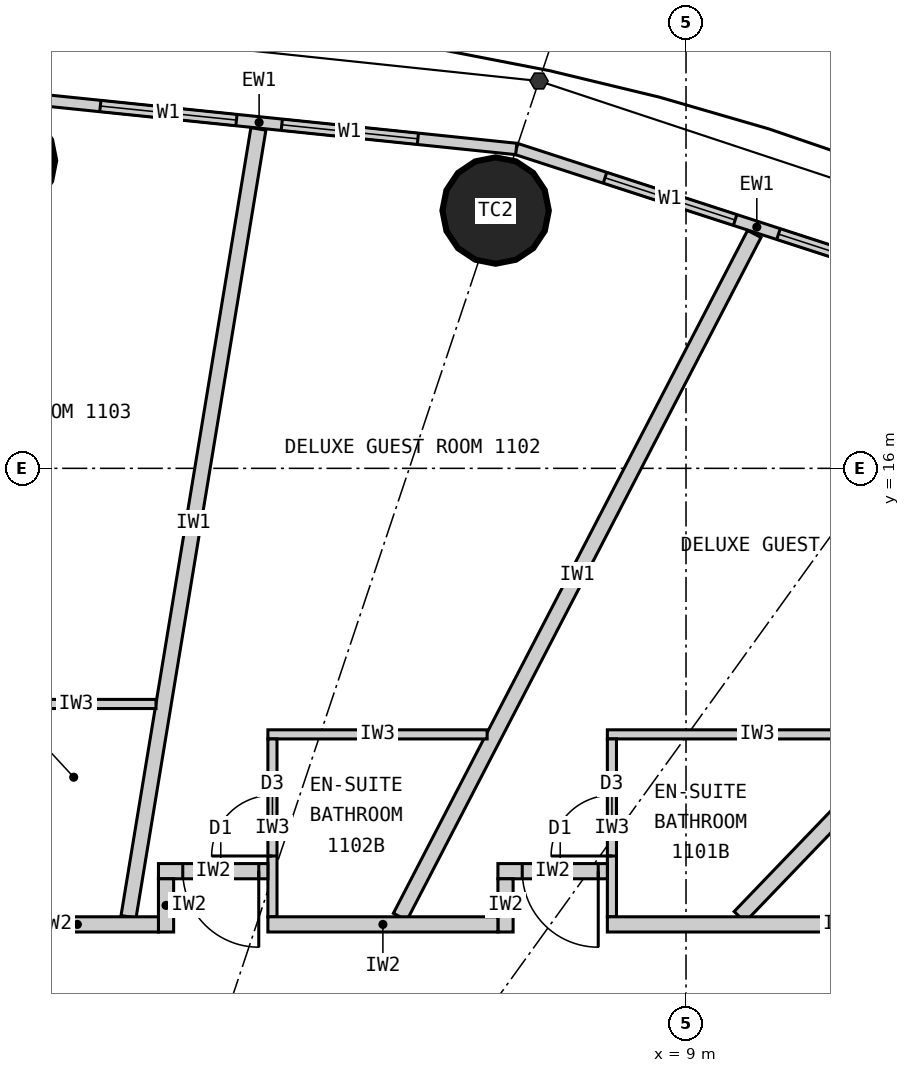
"""IFC4 building model, lengths in metres.
Left out: names, types, materials, properties, quantities, classifications, styles, units other than length and angle.
Written with IfcOpenShell. Run it as: python <this file> out.ifc"""

import sys

from ifc_helpers import new_model, si_unit, direction, frame, frame_2d, origin, origin_2d, place, context, subcontext, project, spatial, rectangle, circle, extrude, element, fill, save


model = new_model("IFC4")
c1 = context("Model", 3, precision=1e-05, world=origin(), true_north=direction((0.0, 1.0)))
c2 = subcontext(c1, "Body", "Model", "MODEL_VIEW")
j1 = project(units=[si_unit("LENGTHUNIT", "METRE"), si_unit("PLANEANGLEUNIT", "RADIAN")], contexts=[c1])
p1 = place(None, origin())
s1 = spatial("IfcSite", under=j1, at=p1, CompositionType="ELEMENT")
p2 = place(p1, origin())
s2 = spatial("IfcBuilding", under=s1, at=p2, CompositionType="ELEMENT")
p3 = place(p2, frame((0.0, 0.0, 50.7)))
s3 = spatial("IfcBuildingStorey", under=s2, at=p3, CompositionType="ELEMENT", Elevation=50.7)
for number, where, z_axis, x_axis in (
    (1, (6.495, 19.391, 0.0), (0.0, 0.0, 1.0), (1.0, 0.0, 0.0)),
    (2, (0.0, 20.05, 0.0), (0.0, 0.0, 1.0), (1.0, 0.0, 0.0)),
):
    element("IfcColumn", number, at=place(p3, frame(where, z_axis=z_axis, x_axis=x_axis)), inside=s3, PredefinedType="COLUMN", context=c2, shape_type="SweptSolid", body=[
        extrude(circle(Radius=0.7, at=origin_2d()), origin(), (0.0, 0.0, 1.0), 3.3),
    ])
p4 = place(p3, frame((13.096, 18.147, 0.0), z_axis=(0.0, 0.0, 1.0), x_axis=(-0.951137534625, 0.308767534285, 0.0)))
e3 = element("IfcWall", 3, at=p4, inside=s3, PredefinedType="ELEMENTEDWALL", context=c2, shape_type="SweptSolid", body=[
    extrude(rectangle(XDim=6.655, YDim=0.15, at=frame_2d((3.328, 0.0))), origin(), (0.0, 0.0, 1.0), 3.12),
])
p5 = place(p4, frame((1.228, 0.0, 0.9)))
e4 = element("IfcOpeningElement", 4, at=p5, cuts=e3, PredefinedType="OPENING", context=c2, shape_type="SweptSolid", body=[
    extrude(rectangle(XDim=1.8, YDim=1.9, at=frame_2d((0.9, 0.95))), frame((0.0, 0.085, 0.0), z_axis=(0.0, -1.0, 0.0), x_axis=(1.0, 0.0, 0.0)), (0.0, 0.0, 1.0), 0.17),
])
p6 = place(p4, frame((3.628, 0.0, 0.9)))
e5 = element("IfcOpeningElement", 5, at=p6, cuts=e3, PredefinedType="OPENING", context=c2, shape_type="SweptSolid", body=[
    extrude(rectangle(XDim=1.8, YDim=1.9, at=frame_2d((0.9, 0.95))), frame((0.0, 0.085, 0.0), z_axis=(0.0, -1.0, 0.0), x_axis=(1.0, 0.0, 0.0)), (0.0, 0.0, 1.0), 0.17),
])
p7 = place(p3, frame((6.766, 20.202, 0.0), z_axis=(0.0, 0.0, 1.0), x_axis=(-0.994721394369, 0.102612609291, 0.0)))
e6 = element("IfcWall", 6, at=p7, inside=s3, PredefinedType="ELEMENTEDWALL", context=c2, shape_type="SweptSolid", body=[
    extrude(rectangle(XDim=6.802, YDim=0.15, at=frame_2d((3.401, 0.0))), origin(), (0.0, 0.0, 1.0), 3.12),
])
p8 = place(p7, frame((1.301, 0.0, 0.9)))
e7 = element("IfcOpeningElement", 7, at=p8, cuts=e6, PredefinedType="OPENING", context=c2, shape_type="SweptSolid", body=[
    extrude(rectangle(XDim=1.8, YDim=1.9, at=frame_2d((0.9, 0.95))), frame((0.0, 0.085, 0.0), z_axis=(0.0, -1.0, 0.0), x_axis=(1.0, 0.0, 0.0)), (0.0, 0.0, 1.0), 0.17),
])
p9 = place(p7, frame((3.701, 0.0, 0.9)))
e8 = element("IfcOpeningElement", 8, at=p9, cuts=e6, PredefinedType="OPENING", context=c2, shape_type="SweptSolid", body=[
    extrude(rectangle(XDim=1.8, YDim=1.9, at=frame_2d((0.9, 0.95))), frame((0.0, 0.085, 0.0), z_axis=(0.0, -1.0, 0.0), x_axis=(1.0, 0.0, 0.0)), (0.0, 0.0, 1.0), 0.17),
])
p10 = place(p3, frame((9.705, 10.1, 0.0), z_axis=(0.0, 0.0, 1.0), x_axis=(0.692879226267, 0.721053658064, 0.0)))
e9 = element("IfcWall", 9, at=p10, inside=s3, PredefinedType="PARTITIONING", context=c2, shape_type="SweptSolid", body=[
    extrude(rectangle(XDim=8.761, YDim=0.2, at=frame_2d((4.38, 0.0))), origin(), (0.0, 0.0, 1.0), 3.12),
])
p11 = place(p3, frame((5.239, 10.1, 0.0), z_axis=(0.0, 0.0, 1.0), x_axis=(0.460422783389, 0.887699758103, 0.0)))
e10 = element("IfcWall", 10, at=p11, inside=s3, PredefinedType="PARTITIONING", context=c2, shape_type="SweptSolid", body=[
    extrude(rectangle(XDim=10.12, YDim=0.2, at=frame_2d((5.06, 0.0))), origin(), (0.0, 0.0, 1.0), 3.12),
])
p12 = place(p3, frame((1.665, 10.1, 0.0), z_axis=(0.0, 0.0, 1.0), x_axis=(0.162657606458, 0.986682574621, 0.0)))
e11 = element("IfcWall", 11, at=p12, inside=s3, PredefinedType="PARTITIONING", context=c2, shape_type="SweptSolid", body=[
    extrude(rectangle(XDim=10.505, YDim=0.2, at=frame_2d((5.252, 0.0))), origin(), (0.0, 0.0, 1.0), 3.12),
])
p13 = place(p3, frame((11.911, 12.5, 0.0), z_axis=(0.0, 0.0, 1.0), x_axis=(-1.0, 0.0, 0.0)))
e12 = element("IfcWall", 12, at=p13, inside=s3, PredefinedType="PARTITIONING", context=c2, shape_type="SweptSolid", body=[
    extrude(rectangle(XDim=3.946, YDim=0.12, at=frame_2d((1.973, 0.0))), origin(), (0.0, 0.0, 1.0), 3.12),
])
p14 = place(p3, frame((8.025, 10.1, 0.0), z_axis=(0.0, 0.0, 1.0), x_axis=(0.0, 1.0, 0.0)))
e13 = element("IfcWall", 13, at=p14, inside=s3, PredefinedType="PARTITIONING", context=c2, shape_type="SweptSolid", body=[
    extrude(rectangle(XDim=2.34, YDim=0.12, at=frame_2d((1.17, 0.0))), origin(), (0.0, 0.0, 1.0), 3.12),
])
p15 = place(p14, frame((0.8, 0.0, 0.0)))
e14 = element("IfcOpeningElement", 14, at=p15, cuts=e13, PredefinedType="OPENING", context=c2, shape_type="SweptSolid", body=[
    extrude(rectangle(XDim=0.8, YDim=2.1, at=frame_2d((0.4, 1.05))), frame((0.0, 0.07, 0.0), z_axis=(0.0, -1.0, 0.0), x_axis=(1.0, 0.0, 0.0)), (0.0, 0.0, 1.0), 0.14),
])
p16 = place(p3, frame((6.383, 12.5, 0.0), z_axis=(0.0, 0.0, 1.0), x_axis=(-1.0, 0.0, 0.0)))
e15 = element("IfcWall", 15, at=p16, inside=s3, PredefinedType="PARTITIONING", context=c2, shape_type="SweptSolid", body=[
    extrude(rectangle(XDim=2.885, YDim=0.12, at=frame_2d((1.442, 0.0))), origin(), (0.0, 0.0, 1.0), 3.12),
])
p17 = place(p3, frame((3.559, 10.1, 0.0), z_axis=(0.0, 0.0, 1.0), x_axis=(0.0, 1.0, 0.0)))
e16 = element("IfcWall", 16, at=p17, inside=s3, PredefinedType="PARTITIONING", context=c2, shape_type="SweptSolid", body=[
    extrude(rectangle(XDim=2.34, YDim=0.12, at=frame_2d((1.17, 0.0))), origin(), (0.0, 0.0, 1.0), 3.12),
])
p18 = place(p17, frame((0.8, 0.0, 0.0)))
e17 = element("IfcOpeningElement", 17, at=p18, cuts=e16, PredefinedType="OPENING", context=c2, shape_type="SweptSolid", body=[
    extrude(rectangle(XDim=0.8, YDim=2.1, at=frame_2d((0.4, 1.05))), frame((0.0, 0.07, 0.0), z_axis=(0.0, -1.0, 0.0), x_axis=(1.0, 0.0, 0.0)), (0.0, 0.0, 1.0), 0.14),
])
p19 = place(p3, frame((2.027, 12.9, 0.0), z_axis=(0.0, 0.0, 1.0), x_axis=(-1.0, 0.0, 0.0)))
e18 = element("IfcWall", 18, at=p19, inside=s3, PredefinedType="PARTITIONING", context=c2, shape_type="SweptSolid", body=[
    extrude(rectangle(XDim=2.102, YDim=0.12, at=frame_2d((1.051, 0.0))), origin(), (0.0, 0.0, 1.0), 3.12),
])
p20 = place(p3, frame((6.525, 10.7, 0.0), z_axis=(0.0, 0.0, 1.0), x_axis=(1.0, 0.0, 0.0)))
e19 = element("IfcWall", 19, at=p20, inside=s3, PredefinedType="PARTITIONING", context=c2, shape_type="SweptSolid", body=[
    extrude(rectangle(XDim=1.44, YDim=0.2, at=frame_2d((0.72, 0.0))), origin(), (0.0, 0.0, 1.0), 3.12),
])
p21 = place(p20, frame((0.32, 0.0, 0.0)))
e20 = element("IfcOpeningElement", 20, at=p21, cuts=e19, PredefinedType="OPENING", context=c2, shape_type="SweptSolid", body=[
    extrude(rectangle(XDim=1.0, YDim=2.2, at=frame_2d((0.5, 1.1))), frame((0.0, 0.11, 0.0), z_axis=(0.0, -1.0, 0.0), x_axis=(1.0, 0.0, 0.0)), (0.0, 0.0, 1.0), 0.22),
])
p22 = place(p3, frame((6.625, 9.9, 0.0), z_axis=(0.0, 0.0, 1.0), x_axis=(0.0, 1.0, 0.0)))
e21 = element("IfcWall", 21, at=p22, inside=s3, PredefinedType="PARTITIONING", context=c2, shape_type="SweptSolid", body=[
    extrude(rectangle(XDim=0.7, YDim=0.2, at=frame_2d((0.35, 0.0))), origin(), (0.0, 0.0, 1.0), 3.12),
])
p23 = place(p3, frame((2.059, 10.7, 0.0), z_axis=(0.0, 0.0, 1.0), x_axis=(1.0, 0.0, 0.0)))
e22 = element("IfcWall", 22, at=p23, inside=s3, PredefinedType="PARTITIONING", context=c2, shape_type="SweptSolid", body=[
    extrude(rectangle(XDim=1.44, YDim=0.2, at=frame_2d((0.72, 0.0))), origin(), (0.0, 0.0, 1.0), 3.12),
])
p24 = place(p23, frame((0.32, 0.0, 0.0)))
e23 = element("IfcOpeningElement", 23, at=p24, cuts=e22, PredefinedType="OPENING", context=c2, shape_type="SweptSolid", body=[
    extrude(rectangle(XDim=1.0, YDim=2.2, at=frame_2d((0.5, 1.1))), frame((0.0, 0.11, 0.0), z_axis=(0.0, -1.0, 0.0), x_axis=(1.0, 0.0, 0.0)), (0.0, 0.0, 1.0), 0.22),
])
p25 = place(p3, frame((2.159, 9.9, 0.0), z_axis=(0.0, 0.0, 1.0), x_axis=(0.0, 1.0, 0.0)))
e24 = element("IfcWall", 24, at=p25, inside=s3, PredefinedType="PARTITIONING", context=c2, shape_type="SweptSolid", body=[
    extrude(rectangle(XDim=0.7, YDim=0.2, at=frame_2d((0.35, 0.0))), origin(), (0.0, 0.0, 1.0), 3.12),
])
p26 = place(p3, frame((-0.075, 10.0, 0.0), z_axis=(0.0, 0.0, 1.0), x_axis=(1.0, 0.0, 0.0)))
e25 = element("IfcWall", 25, at=p26, inside=s3, PredefinedType="PARTITIONING", context=c2, shape_type="SweptSolid", body=[
    extrude(rectangle(XDim=2.134, YDim=0.2, at=frame_2d((1.067, 0.0))), origin(), (0.0, 0.0, 1.0), 3.12),
])
p27 = place(p3, frame((3.499, 10.0, 0.0), z_axis=(0.0, 0.0, 1.0), x_axis=(1.0, 0.0, 0.0)))
e26 = element("IfcWall", 26, at=p27, inside=s3, PredefinedType="PARTITIONING", context=c2, shape_type="SweptSolid", body=[
    extrude(rectangle(XDim=3.027, YDim=0.2, at=frame_2d((1.513, 0.0))), origin(), (0.0, 0.0, 1.0), 3.12),
])
p28 = place(p3, frame((7.965, 10.0, 0.0), z_axis=(0.0, 0.0, 1.0), x_axis=(1.0, 0.0, 0.0)))
e27 = element("IfcWall", 27, at=p28, inside=s3, PredefinedType="PARTITIONING", context=c2, shape_type="SweptSolid", body=[
    extrude(rectangle(XDim=6.135, YDim=0.2, at=frame_2d((3.067, 0.0))), origin(), (0.0, 0.0, 1.0), 3.12),
])
p29 = place(p5, origin())
e28 = element("IfcWindow", 28, at=p29, inside=s3, PartitioningType="SINGLE_PANEL", PredefinedType="WINDOW", context=c2, shape_type="SweptSolid", body=[
    extrude(rectangle(XDim=1.8, YDim=1.9, at=frame_2d((0.9, 0.95))), frame((0.0, 0.03, 0.0), z_axis=(0.0, -1.0, 0.0), x_axis=(1.0, 0.0, 0.0)), (0.0, 0.0, 1.0), 0.06),
])
fill(e4, e28)
p30 = place(p6, origin())
e29 = element("IfcWindow", 29, at=p30, inside=s3, PartitioningType="SINGLE_PANEL", PredefinedType="WINDOW", context=c2, shape_type="SweptSolid", body=[
    extrude(rectangle(XDim=1.8, YDim=1.9, at=frame_2d((0.9, 0.95))), frame((0.0, 0.03, 0.0), z_axis=(0.0, -1.0, 0.0), x_axis=(1.0, 0.0, 0.0)), (0.0, 0.0, 1.0), 0.06),
])
fill(e5, e29)
p31 = place(p8, origin())
e30 = element("IfcWindow", 30, at=p31, inside=s3, PartitioningType="SINGLE_PANEL", PredefinedType="WINDOW", context=c2, shape_type="SweptSolid", body=[
    extrude(rectangle(XDim=1.8, YDim=1.9, at=frame_2d((0.9, 0.95))), frame((0.0, 0.03, 0.0), z_axis=(0.0, -1.0, 0.0), x_axis=(1.0, 0.0, 0.0)), (0.0, 0.0, 1.0), 0.06),
])
fill(e7, e30)
p32 = place(p9, origin())
e31 = element("IfcWindow", 31, at=p32, inside=s3, PartitioningType="SINGLE_PANEL", PredefinedType="WINDOW", context=c2, shape_type="SweptSolid", body=[
    extrude(rectangle(XDim=1.8, YDim=1.9, at=frame_2d((0.9, 0.95))), frame((0.0, 0.03, 0.0), z_axis=(0.0, -1.0, 0.0), x_axis=(1.0, 0.0, 0.0)), (0.0, 0.0, 1.0), 0.06),
])
fill(e8, e31)
p33 = place(p15, origin())
e32 = element("IfcDoor", 32, at=p33, inside=s3, OperationType="SINGLE_SWING_LEFT", PredefinedType="DOOR", context=c2, shape_type="SweptSolid", body=[
    extrude(rectangle(XDim=0.8, YDim=2.1, at=frame_2d((0.4, 1.05))), frame((0.0, 0.025, 0.0), z_axis=(0.0, -1.0, 0.0), x_axis=(1.0, 0.0, 0.0)), (0.0, 0.0, 1.0), 0.05),
])
fill(e14, e32)
p34 = place(p21, origin())
e33 = element("IfcDoor", 33, at=p34, inside=s3, OperationType="SINGLE_SWING_RIGHT", PredefinedType="DOOR", context=c2, shape_type="SweptSolid", body=[
    extrude(rectangle(XDim=1.0, YDim=2.2, at=frame_2d((0.5, 1.1))), frame((0.0, 0.025, 0.0), z_axis=(0.0, -1.0, 0.0), x_axis=(1.0, 0.0, 0.0)), (0.0, 0.0, 1.0), 0.05),
])
fill(e20, e33)
p35 = place(p18, origin())
e34 = element("IfcDoor", 34, at=p35, inside=s3, OperationType="SINGLE_SWING_LEFT", PredefinedType="DOOR", context=c2, shape_type="SweptSolid", body=[
    extrude(rectangle(XDim=0.8, YDim=2.1, at=frame_2d((0.4, 1.05))), frame((0.0, 0.025, 0.0), z_axis=(0.0, -1.0, 0.0), x_axis=(1.0, 0.0, 0.0)), (0.0, 0.0, 1.0), 0.05),
])
fill(e17, e34)
p36 = place(p24, origin())
e35 = element("IfcDoor", 35, at=p36, inside=s3, OperationType="SINGLE_SWING_RIGHT", PredefinedType="DOOR", context=c2, shape_type="SweptSolid", body=[
    extrude(rectangle(XDim=1.0, YDim=2.2, at=frame_2d((0.5, 1.1))), frame((0.0, 0.025, 0.0), z_axis=(0.0, -1.0, 0.0), x_axis=(1.0, 0.0, 0.0)), (0.0, 0.0, 1.0), 0.05),
])
fill(e23, e35)
save(model, sys.argv[1])
